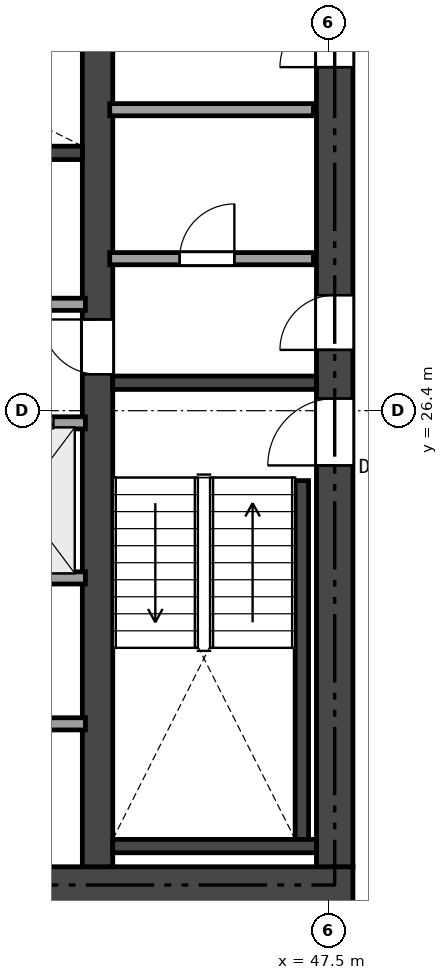
"""IFC4 building model, lengths in metres.
Left out: names, types, materials, properties, quantities, classifications, styles, units other than length and angle.
Written with IfcOpenShell. Run it as: python <this file> out.ifc"""

import sys

from ifc_helpers import new_model, si_unit, direction, frame, frame_2d, origin, place, context, subcontext, project, spatial, rectangle, extrude, element, fill, save


model = new_model("IFC4")
c1 = context("Model", 3, precision=1e-05, world=origin(), true_north=direction((0.0, 1.0)))
c2 = subcontext(c1, "Body", "Model", "MODEL_VIEW")
j1 = project(units=[si_unit("LENGTHUNIT", "METRE"), si_unit("PLANEANGLEUNIT", "RADIAN")], contexts=[c1])
p1 = place(None, origin())
s1 = spatial("IfcSite", under=j1, at=p1, CompositionType="ELEMENT")
p2 = place(p1, origin())
s2 = spatial("IfcBuilding", under=s1, at=p2, CompositionType="ELEMENT")
p3 = place(p2, frame((0.0, 0.0, 168.9)))
s3 = spatial("IfcBuildingStorey", under=s2, at=p3, CompositionType="ELEMENT", Elevation=168.9)
p4 = place(p3, frame((26.5, 18.6, 0.0), z_axis=(0.0, 0.0, 1.0), x_axis=(1.0, 0.0, 0.0)))
e1 = element("IfcWall", 1, at=p4, inside=s3, PredefinedType="SHEAR", context=c2, shape_type="SweptSolid", body=[
    extrude(rectangle(XDim=21.4, YDim=0.6, at=frame_2d((10.7, 0.0))), origin(), (0.0, 0.0, 1.0), 3.24),
])
p5 = place(p4, frame((12.425, 0.0, 0.0)))
e2 = element("IfcOpeningElement", 2, at=p5, cuts=e1, PredefinedType="OPENING", context=c2, shape_type="SweptSolid", body=[
    extrude(rectangle(XDim=1.15, YDim=2.15, at=frame_2d((0.575, 1.075))), frame((0.0, 0.31, 0.0), z_axis=(0.0, -1.0, 0.0), x_axis=(1.0, 0.0, 0.0)), (0.0, 0.0, 1.0), 0.62),
])
p6 = place(p4, frame((5.25, 0.0, 0.0)))
e3 = element("IfcOpeningElement", 3, at=p6, cuts=e1, PredefinedType="OPENING", context=c2, shape_type="SweptSolid", body=[
    extrude(rectangle(XDim=0.9, YDim=2.1, at=frame_2d((0.45, 1.05))), frame((0.0, 0.31, 0.0), z_axis=(0.0, -1.0, 0.0), x_axis=(1.0, 0.0, 0.0)), (0.0, 0.0, 1.0), 0.62),
])
p7 = place(p3, frame((47.6, 18.9, 0.0), z_axis=(0.0, 0.0, 1.0), x_axis=(0.0, 1.0, 0.0)))
e4 = element("IfcWall", 4, at=p7, inside=s3, PredefinedType="SHEAR", context=c2, shape_type="SweptSolid", body=[
    extrude(rectangle(XDim=15.0, YDim=0.6, at=frame_2d((7.5, 0.0))), origin(), (0.0, 0.0, 1.0), 3.24),
])
p8 = place(p7, frame((6.6, 0.0, 0.0)))
e5 = element("IfcOpeningElement", 5, at=p8, cuts=e4, PredefinedType="OPENING", context=c2, shape_type="SweptSolid", body=[
    extrude(rectangle(XDim=1.1, YDim=2.15, at=frame_2d((0.55, 1.075))), frame((0.0, 0.31, 0.0), z_axis=(0.0, -1.0, 0.0), x_axis=(1.0, 0.0, 0.0)), (0.0, 0.0, 1.0), 0.62),
])
p9 = place(p7, frame((8.5, 0.0, 0.0)))
e6 = element("IfcOpeningElement", 6, at=p9, cuts=e4, PredefinedType="OPENING", context=c2, shape_type="SweptSolid", body=[
    extrude(rectangle(XDim=0.9, YDim=2.1, at=frame_2d((0.45, 1.05))), frame((0.0, 0.31, 0.0), z_axis=(0.0, -1.0, 0.0), x_axis=(1.0, 0.0, 0.0)), (0.0, 0.0, 1.0), 0.62),
])
p10 = place(p7, frame((13.15, 0.0, 0.0)))
e7 = element("IfcOpeningElement", 7, at=p10, cuts=e4, PredefinedType="OPENING", context=c2, shape_type="SweptSolid", body=[
    extrude(rectangle(XDim=0.9, YDim=2.1, at=frame_2d((0.45, 1.05))), frame((0.0, 0.31, 0.0), z_axis=(0.0, -1.0, 0.0), x_axis=(1.0, 0.0, 0.0)), (0.0, 0.0, 1.0), 0.62),
])
p11 = place(p3, frame((43.7, 18.9, 0.0), z_axis=(0.0, 0.0, 1.0), x_axis=(0.0, 1.0, 0.0)))
e8 = element("IfcWall", 8, at=p11, inside=s3, PredefinedType="SHEAR", context=c2, shape_type="SweptSolid", body=[
    extrude(rectangle(XDim=15.0, YDim=0.5, at=frame_2d((7.5, 0.0))), origin(), (0.0, 0.0, 1.0), 3.24),
])
p12 = place(p11, frame((8.1, 0.0, 0.0)))
e9 = element("IfcOpeningElement", 9, at=p12, cuts=e8, PredefinedType="OPENING", context=c2, shape_type="SweptSolid", body=[
    extrude(rectangle(XDim=0.9, YDim=2.1, at=frame_2d((0.45, 1.05))), frame((0.0, 0.26, 0.0), z_axis=(0.0, -1.0, 0.0), x_axis=(1.0, 0.0, 0.0)), (0.0, 0.0, 1.0), 0.52),
])
p13 = place(p3, frame((43.95, 26.86, 0.0), z_axis=(0.0, 0.0, 1.0), x_axis=(1.0, 0.0, 0.0)))
e10 = element("IfcWall", 10, at=p13, inside=s3, PredefinedType="SHEAR", context=c2, shape_type="SweptSolid", body=[
    extrude(rectangle(XDim=3.35, YDim=0.22, at=frame_2d((1.675, 0.0))), origin(), (0.0, 0.0, 1.0), 3.24),
])
p14 = place(p3, frame((47.06, 19.35, 0.0), z_axis=(0.0, 0.0, 1.0), x_axis=(0.0, 1.0, 0.0)))
e11 = element("IfcWall", 11, at=p14, inside=s3, PredefinedType="SHEAR", context=c2, shape_type="SweptSolid", body=[
    extrude(rectangle(XDim=5.9, YDim=0.22, at=frame_2d((2.95, 0.0))), origin(), (0.0, 0.0, 1.0), 3.24),
])
p15 = place(p3, frame((43.95, 19.24, 0.0), z_axis=(0.0, 0.0, 1.0), x_axis=(1.0, 0.0, 0.0)))
e12 = element("IfcWall", 12, at=p15, inside=s3, PredefinedType="SHEAR", context=c2, shape_type="SweptSolid", body=[
    extrude(rectangle(XDim=3.35, YDim=0.22, at=frame_2d((1.675, 0.0))), origin(), (0.0, 0.0, 1.0), 3.24),
])
p16 = place(p3, frame((35.84, 30.64, 0.0), z_axis=(0.0, 0.0, 1.0), x_axis=(1.0, 0.0, 0.0)))
e13 = element("IfcWall", 13, at=p16, inside=s3, PredefinedType="SHEAR", context=c2, shape_type="SweptSolid", body=[
    extrude(rectangle(XDim=7.61, YDim=0.22, at=frame_2d((3.805, 0.0))), origin(), (0.0, 0.0, 1.0), 3.24),
])
p17 = place(p3, frame((43.9, 28.9, 0.0), z_axis=(0.0, 0.0, 1.0), x_axis=(1.0, 0.0, 0.0)))
e14 = element("IfcWall", 14, at=p17, inside=s3, PredefinedType="SOLIDWALL", context=c2, shape_type="SweptSolid", body=[
    extrude(rectangle(XDim=3.35, YDim=0.2, at=frame_2d((1.675, 0.0))), origin(), (0.0, 0.0, 1.0), 3.24),
])
p18 = place(p17, frame((1.15, 0.0, 0.0)))
e15 = element("IfcOpeningElement", 15, at=p18, cuts=e14, PredefinedType="OPENING", context=c2, shape_type="SweptSolid", body=[
    extrude(rectangle(XDim=0.9, YDim=2.1, at=frame_2d((0.45, 1.05))), frame((0.0, 0.11, 0.0), z_axis=(0.0, -1.0, 0.0), x_axis=(1.0, 0.0, 0.0)), (0.0, 0.0, 1.0), 0.22),
])
p19 = place(p3, frame((43.9, 31.35, 0.0), z_axis=(0.0, 0.0, 1.0), x_axis=(1.0, 0.0, 0.0)))
e16 = element("IfcWall", 16, at=p19, inside=s3, PredefinedType="SOLIDWALL", context=c2, shape_type="SweptSolid", body=[
    extrude(rectangle(XDim=3.35, YDim=0.2, at=frame_2d((1.675, 0.0))), origin(), (0.0, 0.0, 1.0), 3.24),
])
p20 = place(p3, frame((35.62, 28.15, 0.0), z_axis=(0.0, 0.0, 1.0), x_axis=(1.0, 0.0, 0.0)))
e17 = element("IfcWall", 17, at=p20, inside=s3, PredefinedType="SOLIDWALL", context=c2, shape_type="SweptSolid", body=[
    extrude(rectangle(XDim=7.88, YDim=0.2, at=frame_2d((3.94, 0.0))), origin(), (0.0, 0.0, 1.0), 3.24),
])
p21 = place(p3, frame((35.62, 26.2, 0.0), z_axis=(0.0, 0.0, 1.0), x_axis=(1.0, 0.0, 0.0)))
e18 = element("IfcWall", 18, at=p21, inside=s3, PredefinedType="SOLIDWALL", context=c2, shape_type="SweptSolid", body=[
    extrude(rectangle(XDim=7.88, YDim=0.2, at=frame_2d((3.94, 0.0))), origin(), (0.0, 0.0, 1.0), 3.24),
])
p22 = place(p21, frame((0.405, 0.0, 0.0)))
e19 = element("IfcOpeningElement", 19, at=p22, cuts=e18, PredefinedType="OPENING", context=c2, shape_type="SweptSolid", body=[
    extrude(rectangle(XDim=1.1, YDim=2.15, at=frame_2d((0.55, 1.075))), frame((0.0, 0.11, 0.0), z_axis=(0.0, -1.0, 0.0), x_axis=(1.0, 0.0, 0.0)), (0.0, 0.0, 1.0), 0.22),
])
p23 = place(p21, frame((2.355, 0.0, 0.0)))
e20 = element("IfcOpeningElement", 20, at=p23, cuts=e18, PredefinedType="OPENING", context=c2, shape_type="SweptSolid", body=[
    extrude(rectangle(XDim=1.1, YDim=2.15, at=frame_2d((0.55, 1.075))), frame((0.0, 0.11, 0.0), z_axis=(0.0, -1.0, 0.0), x_axis=(1.0, 0.0, 0.0)), (0.0, 0.0, 1.0), 0.22),
])
p24 = place(p21, frame((4.305, 0.0, 0.0)))
e21 = element("IfcOpeningElement", 21, at=p24, cuts=e18, PredefinedType="OPENING", context=c2, shape_type="SweptSolid", body=[
    extrude(rectangle(XDim=1.1, YDim=2.15, at=frame_2d((0.55, 1.075))), frame((0.0, 0.11, 0.0), z_axis=(0.0, -1.0, 0.0), x_axis=(1.0, 0.0, 0.0)), (0.0, 0.0, 1.0), 0.22),
])
p25 = place(p21, frame((6.255, 0.0, 0.0)))
e22 = element("IfcOpeningElement", 22, at=p25, cuts=e18, PredefinedType="OPENING", context=c2, shape_type="SweptSolid", body=[
    extrude(rectangle(XDim=1.1, YDim=2.15, at=frame_2d((0.55, 1.075))), frame((0.0, 0.11, 0.0), z_axis=(0.0, -1.0, 0.0), x_axis=(1.0, 0.0, 0.0)), (0.0, 0.0, 1.0), 0.22),
])
p26 = place(p3, frame((35.62, 23.65, 0.0), z_axis=(0.0, 0.0, 1.0), x_axis=(1.0, 0.0, 0.0)))
e23 = element("IfcWall", 23, at=p26, inside=s3, PredefinedType="SOLIDWALL", context=c2, shape_type="SweptSolid", body=[
    extrude(rectangle(XDim=7.88, YDim=0.2, at=frame_2d((3.94, 0.0))), origin(), (0.0, 0.0, 1.0), 2.761),
])
p27 = place(p3, frame((35.62, 21.25, 0.0), z_axis=(0.0, 0.0, 1.0), x_axis=(1.0, 0.0, 0.0)))
e24 = element("IfcWall", 24, at=p27, inside=s3, PredefinedType="SOLIDWALL", context=c2, shape_type="SweptSolid", body=[
    extrude(rectangle(XDim=7.88, YDim=0.2, at=frame_2d((3.94, 0.0))), origin(), (0.0, 0.0, 1.0), 3.24),
])
p28 = place(p27, frame((1.13, 0.0, 0.0)))
e25 = element("IfcOpeningElement", 25, at=p28, cuts=e24, PredefinedType="OPENING", context=c2, shape_type="SweptSolid", body=[
    extrude(rectangle(XDim=0.9, YDim=2.1, at=frame_2d((0.45, 1.05))), frame((0.0, 0.11, 0.0), z_axis=(0.0, -1.0, 0.0), x_axis=(1.0, 0.0, 0.0)), (0.0, 0.0, 1.0), 0.22),
])
p29 = place(p27, frame((5.73, 0.0, 0.0)))
e26 = element("IfcOpeningElement", 26, at=p29, cuts=e24, PredefinedType="OPENING", context=c2, shape_type="SweptSolid", body=[
    extrude(rectangle(XDim=0.9, YDim=2.1, at=frame_2d((0.45, 1.05))), frame((0.0, 0.11, 0.0), z_axis=(0.0, -1.0, 0.0), x_axis=(1.0, 0.0, 0.0)), (0.0, 0.0, 1.0), 0.22),
])
p30 = place(p8, origin())
e27 = element("IfcDoor", 27, at=p30, inside=s3, OperationType="SINGLE_SWING_LEFT", PredefinedType="DOOR", context=c2, shape_type="SweptSolid", body=[
    extrude(rectangle(XDim=1.1, YDim=2.15, at=frame_2d((0.55, 1.075))), frame((0.0, 0.025, 0.0), z_axis=(0.0, -1.0, 0.0), x_axis=(1.0, 0.0, 0.0)), (0.0, 0.0, 1.0), 0.05),
])
fill(e5, e27)
p31 = place(p12, origin())
e28 = element("IfcDoor", 28, at=p31, inside=s3, OperationType="SINGLE_SWING_RIGHT", PredefinedType="DOOR", context=c2, shape_type="SweptSolid", body=[
    extrude(rectangle(XDim=0.9, YDim=2.1, at=frame_2d((0.45, 1.05))), frame((0.0, 0.025, 0.0), z_axis=(0.0, -1.0, 0.0), x_axis=(1.0, 0.0, 0.0)), (0.0, 0.0, 1.0), 0.05),
])
fill(e9, e28)
p32 = place(p9, origin())
e29 = element("IfcDoor", 29, at=p32, inside=s3, OperationType="SINGLE_SWING_LEFT", PredefinedType="DOOR", context=c2, shape_type="SweptSolid", body=[
    extrude(rectangle(XDim=0.9, YDim=2.1, at=frame_2d((0.45, 1.05))), frame((0.0, 0.025, 0.0), z_axis=(0.0, -1.0, 0.0), x_axis=(1.0, 0.0, 0.0)), (0.0, 0.0, 1.0), 0.05),
])
fill(e6, e29)
p33 = place(p18, origin())
e30 = element("IfcDoor", 30, at=p33, inside=s3, OperationType="SINGLE_SWING_RIGHT", PredefinedType="DOOR", context=c2, shape_type="SweptSolid", body=[
    extrude(rectangle(XDim=0.9, YDim=2.1, at=frame_2d((0.45, 1.05))), frame((0.0, 0.025, 0.0), z_axis=(0.0, -1.0, 0.0), x_axis=(1.0, 0.0, 0.0)), (0.0, 0.0, 1.0), 0.05),
])
fill(e15, e30)
p34 = place(p10, origin())
e31 = element("IfcDoor", 31, at=p34, inside=s3, OperationType="SINGLE_SWING_LEFT", PredefinedType="DOOR", context=c2, shape_type="SweptSolid", body=[
    extrude(rectangle(XDim=0.9, YDim=2.1, at=frame_2d((0.45, 1.05))), frame((0.0, 0.025, 0.0), z_axis=(0.0, -1.0, 0.0), x_axis=(1.0, 0.0, 0.0)), (0.0, 0.0, 1.0), 0.05),
])
fill(e7, e31)
p35 = place(p25, origin())
e32 = element("IfcDoor", 32, at=p35, inside=s3, OperationType="SLIDING_TO_LEFT", PredefinedType="DOOR", context=c2, shape_type="SweptSolid", body=[
    extrude(rectangle(XDim=1.1, YDim=2.15, at=frame_2d((0.55, 1.075))), frame((0.0, 0.025, 0.0), z_axis=(0.0, -1.0, 0.0), x_axis=(1.0, 0.0, 0.0)), (0.0, 0.0, 1.0), 0.05),
])
fill(e22, e32)
save(model, sys.argv[1])
